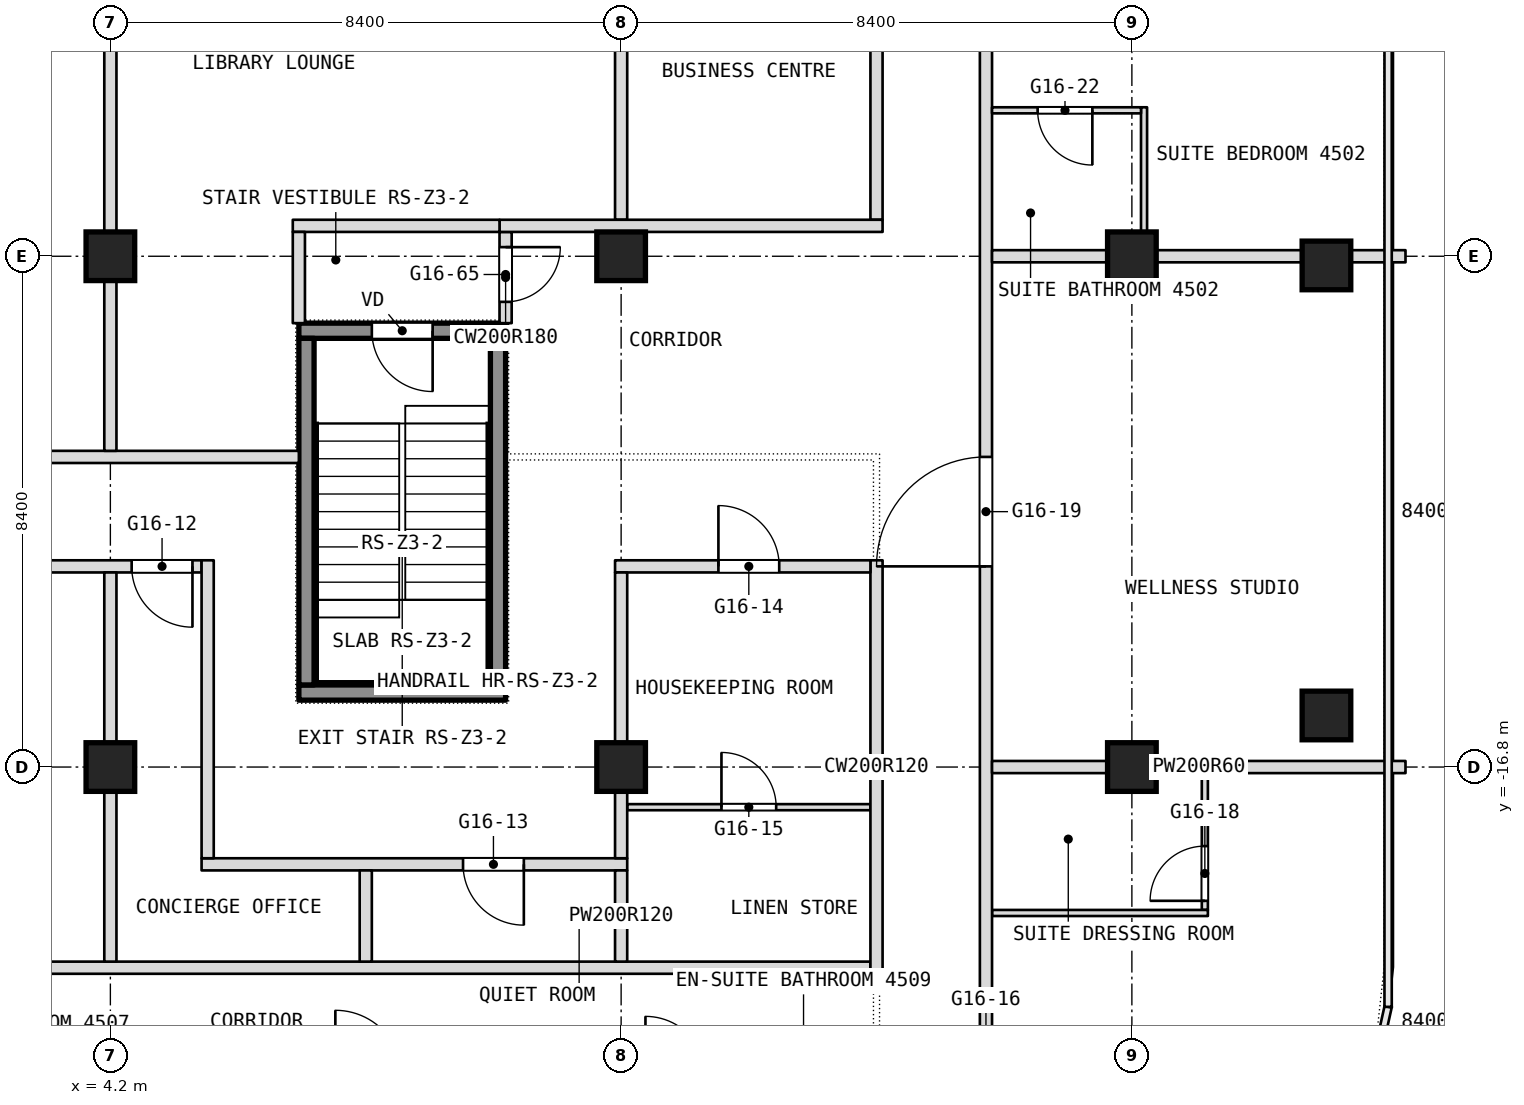
"""IFC4 building model, lengths in metres.
Left out: names, types, materials, properties, quantities, classifications, styles, units other than length and angle.
Written with IfcOpenShell. Run it as: python <this file> out.ifc"""

import sys

from ifc_helpers import new_model, si_unit, direction, frame, frame_2d, origin, origin_2d, place, context, subcontext, project, spatial, rectangle, extrude, element, fill, save


model = new_model("IFC4")
c1 = context("Model", 3, precision=1e-05, world=origin(), true_north=direction((0.0, 1.0)))
c2 = subcontext(c1, "Body", "Model", "MODEL_VIEW")
j1 = project(units=[si_unit("LENGTHUNIT", "METRE"), si_unit("PLANEANGLEUNIT", "RADIAN")], contexts=[c1])
p1 = place(None, origin())
s1 = spatial("IfcSite", under=j1, at=p1, CompositionType="ELEMENT")
p2 = place(p1, origin())
s2 = spatial("IfcBuilding", under=s1, at=p2, CompositionType="ELEMENT")
p3 = place(p2, frame((0.0, 0.0, 198.5)))
s3 = spatial("IfcBuildingStorey", under=s2, at=p3, CompositionType="ELEMENT", Elevation=198.5)
for number, where, z_axis, x_axis in (
    (1, (4.2, -16.8, 0.0), (0.0, 0.0, 1.0), (1.0, 0.0, 0.0)),
    (2, (4.2, -8.4, 0.0), (0.0, 0.0, 1.0), (1.0, 0.0, 0.0)),
    (3, (12.6, -16.8, 0.0), (0.0, 0.0, 1.0), (1.0, 0.0, 0.0)),
    (4, (12.6, -8.4, 0.0), (0.0, 0.0, 1.0), (1.0, 0.0, 0.0)),
    (5, (21.0, -16.8, 0.0), (0.0, 0.0, 1.0), (1.0, 0.0, 0.0)),
    (6, (21.0, -8.4, 0.0), (0.0, 0.0, 1.0), (1.0, 0.0, 0.0)),
    (7, (24.2, -8.551, 0.0), (0.0, 0.0, 1.0), (1.0, 0.0, 0.0)),
    (8, (24.2, -15.952, 0.0), (0.0, 0.0, 1.0), (1.0, 0.0, 0.0)),
):
    element("IfcColumn", number, at=place(p3, frame(where, z_axis=z_axis, x_axis=x_axis)), inside=s3, PredefinedType="COLUMN", context=c2, shape_type="SweptSolid", body=[
        extrude(rectangle(XDim=0.8, YDim=0.8, at=origin_2d()), origin(), (0.0, 0.0, 1.0), 3.6),
    ])
p4 = place(p3, frame((22.2, -19.15, 0.0), z_axis=(0.0, 0.0, 1.0), x_axis=(0.0, 1.0, 0.0)))
e9 = element("IfcWall", 9, at=p4, inside=s3, PredefinedType="PARTITIONING", context=c2, shape_type="SweptSolid", body=[
    extrude(rectangle(XDim=2.45, YDim=0.1, at=frame_2d((1.225, 0.0))), origin(), (0.0, 0.0, 1.0), 3.34),
])
p5 = place(p4, frame((0.15, 0.0, 0.0)))
e10 = element("IfcOpeningElement", 10, at=p5, cuts=e9, PredefinedType="OPENING", context=c2, shape_type="SweptSolid", body=[
    extrude(rectangle(XDim=0.9, YDim=2.1, at=frame_2d((0.45, 1.05))), frame((0.0, 0.05, 0.0), z_axis=(0.0, -1.0, 0.0), x_axis=(1.0, 0.0, 0.0)), (0.0, 0.0, 1.0), 0.1),
])
p6 = place(p3, frame((21.2, -8.3, 0.0), z_axis=(0.0, 0.0, 1.0), x_axis=(0.0, 1.0, 0.0)))
e11 = element("IfcWall", 11, at=p6, inside=s3, PredefinedType="PARTITIONING", context=c2, shape_type="SweptSolid", body=[
    extrude(rectangle(XDim=2.35, YDim=0.1, at=frame_2d((1.175, 0.0))), origin(), (0.0, 0.0, 1.0), 3.34),
])
p7 = place(p3, frame((-4.1, -20.1, 0.0), z_axis=(0.0, 0.0, 1.0), x_axis=(1.0, 0.0, 0.0)))
e12 = element("IfcWall", 12, at=p7, inside=s3, PredefinedType="PARTITIONING", context=c2, shape_type="SweptSolid", body=[
    extrude(rectangle(XDim=20.8, YDim=0.2, at=frame_2d((10.4, 0.0))), origin(), (0.0, 0.0, 1.0), 3.34),
])
p8 = place(p3, frame((18.7, -19.2, 0.0), z_axis=(0.0, 0.0, 1.0), x_axis=(1.0, 0.0, 0.0)))
e13 = element("IfcWall", 13, at=p8, inside=s3, PredefinedType="PARTITIONING", context=c2, shape_type="SweptSolid", body=[
    extrude(rectangle(XDim=3.55, YDim=0.1, at=frame_2d((1.775, 0.0))), origin(), (0.0, 0.0, 1.0), 3.34),
])
p9 = place(p3, frame((18.6, -26.751, 0.0), z_axis=(0.0, 0.0, 1.0), x_axis=(0.0, 1.0, 0.0)))
e14 = element("IfcWall", 14, at=p9, inside=s3, PredefinedType="PARTITIONING", context=c2, shape_type="SweptSolid", body=[
    extrude(rectangle(XDim=49.091, YDim=0.2, at=frame_2d((24.545, 0.0))), origin(), (0.0, 0.0, 1.0), 3.34),
])
p10 = place(p9, frame((4.576, 0.0, 0.0)))
e15 = element("IfcOpeningElement", 15, at=p10, cuts=e14, PredefinedType="OPENING", context=c2, shape_type="SweptSolid", body=[
    extrude(rectangle(XDim=1.1, YDim=2.1, at=frame_2d((0.55, 1.05))), frame((0.0, 0.1, 0.0), z_axis=(0.0, -1.0, 0.0), x_axis=(1.0, 0.0, 0.0)), (0.0, 0.0, 1.0), 0.2),
])
p11 = place(p9, frame((13.251, 0.0, 0.0)))
e16 = element("IfcOpeningElement", 16, at=p11, cuts=e14, PredefinedType="OPENING", context=c2, shape_type="SweptSolid", body=[
    extrude(rectangle(XDim=1.8, YDim=2.1, at=frame_2d((0.9, 1.05))), frame((0.0, 0.1, 0.0), z_axis=(0.0, -1.0, 0.0), x_axis=(1.0, 0.0, 0.0)), (0.0, 0.0, 1.0), 0.2),
])
p12 = place(p9, frame((24.101, 0.0, 0.0)))
e17 = element("IfcOpeningElement", 17, at=p12, cuts=e14, PredefinedType="OPENING", context=c2, shape_type="SweptSolid", body=[
    extrude(rectangle(XDim=1.1, YDim=2.1, at=frame_2d((0.55, 1.05))), frame((0.0, 0.1, 0.0), z_axis=(0.0, -1.0, 0.0), x_axis=(1.0, 0.0, 0.0)), (0.0, 0.0, 1.0), 0.2),
])
p13 = place(p9, frame((30.051, 0.0, 0.0)))
e18 = element("IfcOpeningElement", 18, at=p13, cuts=e14, PredefinedType="OPENING", context=c2, shape_type="SweptSolid", body=[
    extrude(rectangle(XDim=1.8, YDim=2.1, at=frame_2d((0.9, 1.05))), frame((0.0, 0.1, 0.0), z_axis=(0.0, -1.0, 0.0), x_axis=(1.0, 0.0, 0.0)), (0.0, 0.0, 1.0), 0.2),
])
p14 = place(p9, frame((37.951, 0.0, 0.0)))
e19 = element("IfcOpeningElement", 19, at=p14, cuts=e14, PredefinedType="OPENING", context=c2, shape_type="SweptSolid", body=[
    extrude(rectangle(XDim=1.0, YDim=2.1, at=frame_2d((0.5, 1.05))), frame((0.0, 0.1, 0.0), z_axis=(0.0, -1.0, 0.0), x_axis=(1.0, 0.0, 0.0)), (0.0, 0.0, 1.0), 0.2),
])
p15 = place(p9, frame((39.751, 0.0, 0.0)))
e20 = element("IfcOpeningElement", 20, at=p15, cuts=e14, PredefinedType="OPENING", context=c2, shape_type="SweptSolid", body=[
    extrude(rectangle(XDim=1.0, YDim=2.1, at=frame_2d((0.5, 1.05))), frame((0.0, 0.1, 0.0), z_axis=(0.0, -1.0, 0.0), x_axis=(1.0, 0.0, 0.0)), (0.0, 0.0, 1.0), 0.2),
])
p16 = place(p9, frame((45.851, 0.0, 0.0)))
e21 = element("IfcOpeningElement", 21, at=p16, cuts=e14, PredefinedType="OPENING", context=c2, shape_type="SweptSolid", body=[
    extrude(rectangle(XDim=1.0, YDim=2.1, at=frame_2d((0.5, 1.05))), frame((0.0, 0.1, 0.0), z_axis=(0.0, -1.0, 0.0), x_axis=(1.0, 0.0, 0.0)), (0.0, 0.0, 1.0), 0.2),
])
p17 = place(p3, frame((5.7, -18.4, 0.0), z_axis=(0.0, 0.0, 1.0), x_axis=(1.0, 0.0, 0.0)))
e22 = element("IfcWall", 22, at=p17, inside=s3, PredefinedType="PARTITIONING", context=c2, shape_type="SweptSolid", body=[
    extrude(rectangle(XDim=7.0, YDim=0.2, at=frame_2d((3.5, 0.0))), origin(), (0.0, 0.0, 1.0), 3.34),
])
p18 = place(p17, frame((4.3, 0.0, 0.0)))
e23 = element("IfcOpeningElement", 23, at=p18, cuts=e22, PredefinedType="OPENING", context=c2, shape_type="SweptSolid", body=[
    extrude(rectangle(XDim=1.0, YDim=2.1, at=frame_2d((0.5, 1.05))), frame((0.0, 0.1, 0.0), z_axis=(0.0, -1.0, 0.0), x_axis=(1.0, 0.0, 0.0)), (0.0, 0.0, 1.0), 0.2),
])
p19 = place(p3, frame((12.7, -17.46, 0.0), z_axis=(0.0, 0.0, 1.0), x_axis=(1.0, 0.0, 0.0)))
e24 = element("IfcWall", 24, at=p19, inside=s3, PredefinedType="PARTITIONING", context=c2, shape_type="SweptSolid", body=[
    extrude(rectangle(XDim=4.0, YDim=0.1, at=frame_2d((2.0, 0.0))), origin(), (0.0, 0.0, 1.0), 3.34),
])
p20 = place(p19, frame((1.55, 0.0, 0.0)))
e25 = element("IfcOpeningElement", 25, at=p20, cuts=e24, PredefinedType="OPENING", context=c2, shape_type="SweptSolid", body=[
    extrude(rectangle(XDim=0.9, YDim=2.1, at=frame_2d((0.45, 1.05))), frame((0.0, 0.05, 0.0), z_axis=(0.0, -1.0, 0.0), x_axis=(1.0, 0.0, 0.0)), (0.0, 0.0, 1.0), 0.1),
])
p21 = place(p3, frame((16.8, -20.2, 0.0), z_axis=(0.0, 0.0, 1.0), x_axis=(0.0, 1.0, 0.0)))
e26 = element("IfcWall", 26, at=p21, inside=s3, PredefinedType="PARTITIONING", context=c2, shape_type="SweptSolid", body=[
    extrude(rectangle(XDim=6.8, YDim=0.2, at=frame_2d((3.4, 0.0))), origin(), (0.0, 0.0, 1.0), 3.34),
])
p22 = place(p3, frame((16.8, -7.8, 0.0), z_axis=(0.0, 0.0, 1.0), x_axis=(0.0, 1.0, 0.0)))
e27 = element("IfcWall", 27, at=p22, inside=s3, PredefinedType="PARTITIONING", context=c2, shape_type="SweptSolid", body=[
    extrude(rectangle(XDim=5.9, YDim=0.2, at=frame_2d((2.95, 0.0))), origin(), (0.0, 0.0, 1.0), 3.34),
])
p23 = place(p3, frame((18.7, -16.8, 0.0), z_axis=(0.0, 0.0, 1.0), x_axis=(1.0, 0.0, 0.0)))
e28 = element("IfcWall", 28, at=p23, inside=s3, PredefinedType="PARTITIONING", context=c2, shape_type="SweptSolid", body=[
    extrude(rectangle(XDim=6.8, YDim=0.2, at=frame_2d((3.4, 0.0))), origin(), (0.0, 0.0, 1.0), 2.94),
])
p24 = place(p3, frame((-4.3, -13.5, 0.0), z_axis=(0.0, 0.0, 1.0), x_axis=(1.0, 0.0, 0.0)))
e29 = element("IfcWall", 29, at=p24, inside=s3, PredefinedType="PARTITIONING", context=c2, shape_type="SweptSolid", body=[
    extrude(rectangle(XDim=10.0, YDim=0.2, at=frame_2d((5.0, 0.0))), origin(), (0.0, 0.0, 1.0), 3.34),
])
p25 = place(p24, frame((3.4, 0.0, 0.0)))
e30 = element("IfcOpeningElement", 30, at=p25, cuts=e29, PredefinedType="OPENING", context=c2, shape_type="SweptSolid", body=[
    extrude(rectangle(XDim=1.8, YDim=2.1, at=frame_2d((0.9, 1.05))), frame((0.0, 0.1, 0.0), z_axis=(0.0, -1.0, 0.0), x_axis=(1.0, 0.0, 0.0)), (0.0, 0.0, 1.0), 0.2),
])
p26 = place(p24, frame((8.85, 0.0, 0.0)))
e31 = element("IfcOpeningElement", 31, at=p26, cuts=e29, PredefinedType="OPENING", context=c2, shape_type="SweptSolid", body=[
    extrude(rectangle(XDim=1.0, YDim=2.1, at=frame_2d((0.5, 1.05))), frame((0.0, 0.1, 0.0), z_axis=(0.0, -1.0, 0.0), x_axis=(1.0, 0.0, 0.0)), (0.0, 0.0, 1.0), 0.2),
])
p27 = place(p3, frame((12.5, -13.5, 0.0), z_axis=(0.0, 0.0, 1.0), x_axis=(1.0, 0.0, 0.0)))
e32 = element("IfcWall", 32, at=p27, inside=s3, PredefinedType="PARTITIONING", context=c2, shape_type="SweptSolid", body=[
    extrude(rectangle(XDim=4.2, YDim=0.2, at=frame_2d((2.1, 0.0))), origin(), (0.0, 0.0, 1.0), 3.34),
])
p28 = place(p27, frame((1.7, 0.0, 0.0)))
e33 = element("IfcOpeningElement", 33, at=p28, cuts=e32, PredefinedType="OPENING", context=c2, shape_type="SweptSolid", body=[
    extrude(rectangle(XDim=1.0, YDim=2.1, at=frame_2d((0.5, 1.05))), frame((0.0, 0.1, 0.0), z_axis=(0.0, -1.0, 0.0), x_axis=(1.0, 0.0, 0.0)), (0.0, 0.0, 1.0), 0.2),
])
p29 = place(p3, frame((12.6, -20.0, 0.0), z_axis=(0.0, 0.0, 1.0), x_axis=(0.0, 1.0, 0.0)))
e34 = element("IfcWall", 34, at=p29, inside=s3, PredefinedType="PARTITIONING", context=c2, shape_type="SweptSolid", body=[
    extrude(rectangle(XDim=1.5, YDim=0.2, at=frame_2d((0.75, 0.0))), origin(), (0.0, 0.0, 1.0), 3.34),
])
p30 = place(p3, frame((12.6, -7.8, 0.0), z_axis=(0.0, 0.0, 1.0), x_axis=(0.0, 1.0, 0.0)))
e35 = element("IfcWall", 35, at=p30, inside=s3, PredefinedType="PARTITIONING", context=c2, shape_type="SweptSolid", body=[
    extrude(rectangle(XDim=5.9, YDim=0.2, at=frame_2d((2.95, 0.0))), origin(), (0.0, 0.0, 1.0), 3.34),
])
p31 = place(p3, frame((12.6, -18.3, 0.0), z_axis=(0.0, 0.0, 1.0), x_axis=(0.0, 1.0, 0.0)))
e36 = element("IfcWall", 36, at=p31, inside=s3, PredefinedType="PARTITIONING", context=c2, shape_type="SweptSolid", body=[
    extrude(rectangle(XDim=4.7, YDim=0.2, at=frame_2d((2.35, 0.0))), origin(), (0.0, 0.0, 1.0), 3.34),
])
p32 = place(p3, frame((-7.3, -11.7, 0.0), z_axis=(0.0, 0.0, 1.0), x_axis=(1.0, 0.0, 0.0)))
e37 = element("IfcWall", 37, at=p32, inside=s3, PredefinedType="PARTITIONING", context=c2, shape_type="SweptSolid", body=[
    extrude(rectangle(XDim=14.6, YDim=0.2, at=frame_2d((7.3, 0.0))), origin(), (0.0, 0.0, 1.0), 3.34),
])
p33 = place(p3, frame((10.7, -9.5, 0.0), z_axis=(0.0, 0.0, 1.0), x_axis=(0.0, 1.0, 0.0)))
e38 = element("IfcWall", 38, at=p33, inside=s3, PredefinedType="PARTITIONING", context=c2, shape_type="SweptSolid", body=[
    extrude(rectangle(XDim=1.5, YDim=0.2, at=frame_2d((0.75, 0.0))), origin(), (0.0, 0.0, 1.0), 3.34),
])
p34 = place(p33, frame((0.35, 0.0, 0.0)))
e39 = element("IfcOpeningElement", 39, at=p34, cuts=e38, PredefinedType="OPENING", context=c2, shape_type="SweptSolid", body=[
    extrude(rectangle(XDim=0.9, YDim=2.1, at=frame_2d((0.45, 1.05))), frame((0.0, 0.1, 0.0), z_axis=(0.0, -1.0, 0.0), x_axis=(1.0, 0.0, 0.0)), (0.0, 0.0, 1.0), 0.2),
])
p35 = place(p3, frame((8.4, -20.0, 0.0), z_axis=(0.0, 0.0, 1.0), x_axis=(0.0, 1.0, 0.0)))
e40 = element("IfcWall", 40, at=p35, inside=s3, PredefinedType="PARTITIONING", context=c2, shape_type="SweptSolid", body=[
    extrude(rectangle(XDim=1.5, YDim=0.2, at=frame_2d((0.75, 0.0))), origin(), (0.0, 0.0, 1.0), 3.34),
])
p36 = place(p3, frame((18.7, -8.4, 0.0), z_axis=(0.0, 0.0, 1.0), x_axis=(1.0, 0.0, 0.0)))
e41 = element("IfcWall", 41, at=p36, inside=s3, PredefinedType="PARTITIONING", context=c2, shape_type="SweptSolid", body=[
    extrude(rectangle(XDim=6.8, YDim=0.2, at=frame_2d((3.4, 0.0))), origin(), (0.0, 0.0, 1.0), 2.94),
])
p37 = place(p3, frame((10.6, -7.9, 0.0), z_axis=(0.0, 0.0, 1.0), x_axis=(1.0, 0.0, 0.0)))
e42 = element("IfcWall", 42, at=p37, inside=s3, PredefinedType="PARTITIONING", context=c2, shape_type="SweptSolid", body=[
    extrude(rectangle(XDim=6.3, YDim=0.2, at=frame_2d((3.15, 0.0))), origin(), (0.0, 0.0, 1.0), 3.34),
])
p38 = place(p3, frame((7.2, -7.9, 0.0), z_axis=(0.0, 0.0, 1.0), x_axis=(1.0, 0.0, 0.0)))
e43 = element("IfcWall", 43, at=p38, inside=s3, PredefinedType="PARTITIONING", context=c2, shape_type="SweptSolid", body=[
    extrude(rectangle(XDim=3.4, YDim=0.2, at=frame_2d((1.7, 0.0))), origin(), (0.0, 0.0, 1.0), 3.34),
])
p39 = place(p3, frame((7.3, -9.5, 0.0), z_axis=(0.0, 0.0, 1.0), x_axis=(0.0, 1.0, 0.0)))
e44 = element("IfcWall", 44, at=p39, inside=s3, PredefinedType="PARTITIONING", context=c2, shape_type="SweptSolid", body=[
    extrude(rectangle(XDim=1.5, YDim=0.2, at=frame_2d((0.75, 0.0))), origin(), (0.0, 0.0, 1.0), 3.34),
])
p40 = place(p3, frame((18.7, -6.0, 0.0), z_axis=(0.0, 0.0, 1.0), x_axis=(1.0, 0.0, 0.0)))
e45 = element("IfcWall", 45, at=p40, inside=s3, PredefinedType="PARTITIONING", context=c2, shape_type="SweptSolid", body=[
    extrude(rectangle(XDim=2.45, YDim=0.1, at=frame_2d((1.225, 0.0))), origin(), (0.0, 0.0, 1.0), 3.34),
])
p41 = place(p40, frame((0.75, 0.0, 0.0)))
e46 = element("IfcOpeningElement", 46, at=p41, cuts=e45, PredefinedType="OPENING", context=c2, shape_type="SweptSolid", body=[
    extrude(rectangle(XDim=0.9, YDim=2.1, at=frame_2d((0.45, 1.05))), frame((0.0, 0.05, 0.0), z_axis=(0.0, -1.0, 0.0), x_axis=(1.0, 0.0, 0.0)), (0.0, 0.0, 1.0), 0.1),
])
p42 = place(p3, frame((5.8, -18.3, 0.0), z_axis=(0.0, 0.0, 1.0), x_axis=(0.0, 1.0, 0.0)))
e47 = element("IfcWall", 47, at=p42, inside=s3, PredefinedType="PARTITIONING", context=c2, shape_type="SweptSolid", body=[
    extrude(rectangle(XDim=4.9, YDim=0.2, at=frame_2d((2.45, 0.0))), origin(), (0.0, 0.0, 1.0), 3.34),
])
p43 = place(p3, frame((4.2, -20.0, 0.0), z_axis=(0.0, 0.0, 1.0), x_axis=(0.0, 1.0, 0.0)))
e48 = element("IfcWall", 48, at=p43, inside=s3, PredefinedType="PARTITIONING", context=c2, shape_type="SweptSolid", body=[
    extrude(rectangle(XDim=6.4, YDim=0.2, at=frame_2d((3.2, 0.0))), origin(), (0.0, 0.0, 1.0), 3.34),
])
p44 = place(p3, frame((4.2, -11.6, 0.0), z_axis=(0.0, 0.0, 1.0), x_axis=(0.0, 1.0, 0.0)))
e49 = element("IfcWall", 49, at=p44, inside=s3, PredefinedType="PARTITIONING", context=c2, shape_type="SweptSolid", body=[
    extrude(rectangle(XDim=9.7, YDim=0.2, at=frame_2d((4.85, 0.0))), origin(), (0.0, 0.0, 1.0), 3.34),
])
p45 = place(p3, frame((7.3, -15.575, 0.1), z_axis=(0.0, 0.0, 1.0), x_axis=(1.0, 0.0, 0.0)))
e50 = element("IfcWall", 50, at=p45, inside=s3, PredefinedType="SHEAR", context=c2, shape_type="SweptSolid", body=[
    extrude(rectangle(XDim=3.4, YDim=0.25, at=frame_2d((1.7, 0.0))), origin(), (0.0, 0.0, 1.0), 3.6),
])
p46 = place(p3, frame((7.3, -9.625, 0.1), z_axis=(0.0, 0.0, 1.0), x_axis=(1.0, 0.0, 0.0)))
e51 = element("IfcWall", 51, at=p46, inside=s3, PredefinedType="SHEAR", context=c2, shape_type="SweptSolid", body=[
    extrude(rectangle(XDim=3.4, YDim=0.25, at=frame_2d((1.7, 0.0))), origin(), (0.0, 0.0, 1.0), 3.6),
])
p47 = place(p46, frame((1.2, 0.0, 0.0)))
e52 = element("IfcOpeningElement", 52, at=p47, cuts=e51, PredefinedType="OPENING", context=c2, shape_type="SweptSolid", body=[
    extrude(rectangle(XDim=1.0, YDim=2.1, at=frame_2d((0.5, 1.05))), frame((0.0, 0.125, 0.0), z_axis=(0.0, -1.0, 0.0), x_axis=(1.0, 0.0, 0.0)), (0.0, 0.0, 1.0), 0.25),
])
for number, where, z_axis, x_axis in (
    (53, (7.425, -15.45, 0.1), (0.0, 0.0, 1.0), (0.0, 1.0, 0.0)),
    (54, (10.575, -15.45, 0.1), (0.0, 0.0, 1.0), (0.0, 1.0, 0.0)),
):
    element("IfcWall", number, at=place(p3, frame(where, z_axis=z_axis, x_axis=x_axis)), inside=s3, PredefinedType="SHEAR", context=c2, shape_type="SweptSolid", body=[
        extrude(rectangle(XDim=5.7, YDim=0.25, at=frame_2d((2.85, 0.0))), origin(), (0.0, 0.0, 1.0), 3.6),
    ])
p48 = place(p5, origin())
e55 = element("IfcDoor", 55, at=p48, inside=s3, OperationType="SINGLE_SWING_LEFT", PredefinedType="DOOR", context=c2, shape_type="SweptSolid", body=[
    extrude(rectangle(XDim=0.9, YDim=2.1, at=frame_2d((0.45, 1.05))), frame((0.0, 0.025, 0.0), z_axis=(0.0, -1.0, 0.0), x_axis=(1.0, 0.0, 0.0)), (0.0, 0.0, 1.0), 0.05),
])
fill(e10, e55)
p49 = place(p11, origin())
e56 = element("IfcDoor", 56, at=p49, inside=s3, OperationType="DOUBLE_DOOR_SINGLE_SWING", PredefinedType="DOOR", context=c2, shape_type="SweptSolid", body=[
    extrude(rectangle(XDim=1.8, YDim=2.1, at=frame_2d((0.9, 1.05))), frame((0.0, 0.025, 0.0), z_axis=(0.0, -1.0, 0.0), x_axis=(1.0, 0.0, 0.0)), (0.0, 0.0, 1.0), 0.05),
])
fill(e16, e56)
p50 = place(p18, origin())
e57 = element("IfcDoor", 57, at=p50, inside=s3, OperationType="SINGLE_SWING_RIGHT", PredefinedType="DOOR", context=c2, shape_type="SweptSolid", body=[
    extrude(rectangle(XDim=1.0, YDim=2.1, at=frame_2d((0.5, 1.05))), frame((0.0, 0.025, 0.0), z_axis=(0.0, -1.0, 0.0), x_axis=(1.0, 0.0, 0.0)), (0.0, 0.0, 1.0), 0.05),
])
fill(e23, e57)
p51 = place(p20, origin())
e58 = element("IfcDoor", 58, at=p51, inside=s3, OperationType="SINGLE_SWING_RIGHT", PredefinedType="DOOR", context=c2, shape_type="SweptSolid", body=[
    extrude(rectangle(XDim=0.9, YDim=2.1, at=frame_2d((0.45, 1.05))), frame((0.0, 0.025, 0.0), z_axis=(0.0, -1.0, 0.0), x_axis=(1.0, 0.0, 0.0)), (0.0, 0.0, 1.0), 0.05),
])
fill(e25, e58)
p52 = place(p26, origin())
e59 = element("IfcDoor", 59, at=p52, inside=s3, OperationType="SINGLE_SWING_LEFT", PredefinedType="DOOR", context=c2, shape_type="SweptSolid", body=[
    extrude(rectangle(XDim=1.0, YDim=2.1, at=frame_2d((0.5, 1.05))), frame((0.0, 0.025, 0.0), z_axis=(0.0, -1.0, 0.0), x_axis=(1.0, 0.0, 0.0)), (0.0, 0.0, 1.0), 0.05),
])
fill(e31, e59)
p53 = place(p28, origin())
e60 = element("IfcDoor", 60, at=p53, inside=s3, OperationType="SINGLE_SWING_RIGHT", PredefinedType="DOOR", context=c2, shape_type="SweptSolid", body=[
    extrude(rectangle(XDim=1.0, YDim=2.1, at=frame_2d((0.5, 1.05))), frame((0.0, 0.025, 0.0), z_axis=(0.0, -1.0, 0.0), x_axis=(1.0, 0.0, 0.0)), (0.0, 0.0, 1.0), 0.05),
])
fill(e33, e60)
p54 = place(p34, origin())
e61 = element("IfcDoor", 61, at=p54, inside=s3, OperationType="SINGLE_SWING_RIGHT", PredefinedType="DOOR", context=c2, shape_type="SweptSolid", body=[
    extrude(rectangle(XDim=0.9, YDim=2.1, at=frame_2d((0.45, 1.05))), frame((0.0, 0.025, 0.0), z_axis=(0.0, -1.0, 0.0), x_axis=(1.0, 0.0, 0.0)), (0.0, 0.0, 1.0), 0.05),
])
fill(e39, e61)
p55 = place(p41, origin())
e62 = element("IfcDoor", 62, at=p55, inside=s3, OperationType="SINGLE_SWING_RIGHT", PredefinedType="DOOR", context=c2, shape_type="SweptSolid", body=[
    extrude(rectangle(XDim=0.9, YDim=2.1, at=frame_2d((0.45, 1.05))), frame((0.0, 0.025, 0.0), z_axis=(0.0, -1.0, 0.0), x_axis=(1.0, 0.0, 0.0)), (0.0, 0.0, 1.0), 0.05),
])
fill(e46, e62)
p56 = place(p47, origin())
e63 = element("IfcDoor", 63, at=p56, inside=s3, OperationType="SINGLE_SWING_LEFT", PredefinedType="DOOR", context=c2, shape_type="SweptSolid", body=[
    extrude(rectangle(XDim=1.0, YDim=2.1, at=frame_2d((0.5, 1.05))), frame((0.0, 0.025, 0.0), z_axis=(0.0, -1.0, 0.0), x_axis=(1.0, 0.0, 0.0)), (0.0, 0.0, 1.0), 0.05),
])
fill(e52, e63)
save(model, sys.argv[1])
